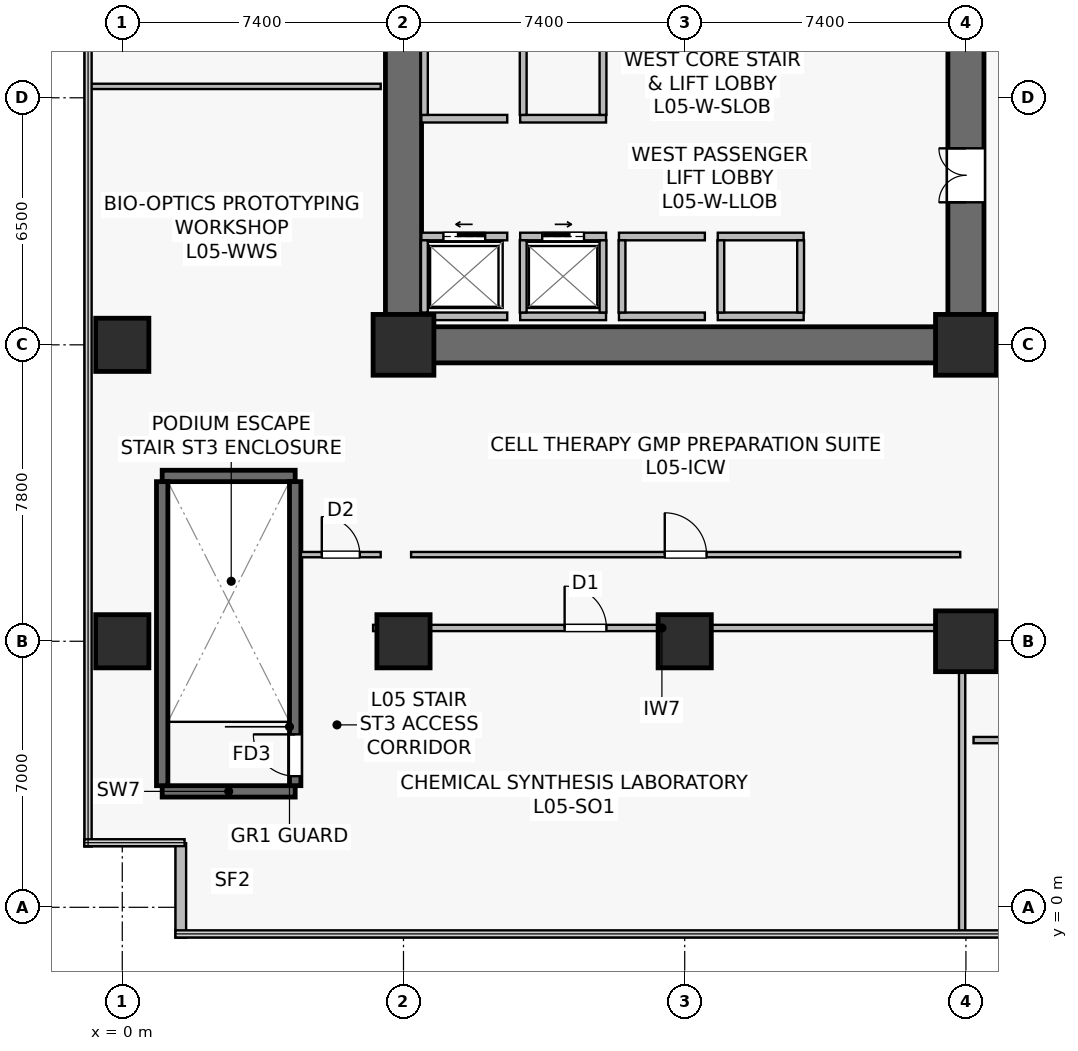
"""IFC4 building model, lengths in metres.
Left out: names, types, materials, properties, quantities, classifications, styles, units other than length and angle.
Written with IfcOpenShell. Run it as: python <this file> out.ifc"""

import sys

from ifc_helpers import new_model, si_unit, direction, frame, frame_2d, origin, origin_2d, place, context, subcontext, project, spatial, rectangle, extrude, source, transform, mapped, element, fill, save


model = new_model("IFC4")
c1 = context("Model", 3, precision=1e-05, world=origin(), true_north=direction((0.0, 1.0)))
c2 = subcontext(c1, "Body", "Model", "MODEL_VIEW")
j1 = project(units=[si_unit("LENGTHUNIT", "METRE"), si_unit("PLANEANGLEUNIT", "RADIAN")], contexts=[c1])
p1 = place(None, origin())
s1 = spatial("IfcSite", under=j1, at=p1, CompositionType="ELEMENT")
p2 = place(p1, origin())
s2 = spatial("IfcBuilding", under=s1, at=p2, CompositionType="ELEMENT")
p3 = place(p2, frame((0.0, 0.0, 19.8)))
s3 = spatial("IfcBuildingStorey", under=s2, at=p3, CompositionType="ELEMENT", Elevation=19.8)
p4 = place(p3, frame((6.925, 14.8, 0.0), z_axis=(0.0, 0.0, 1.0), x_axis=(1.0, 0.0, 0.0)))
e1 = element("IfcWall", 1, at=p4, inside=s3, PredefinedType="SHEAR", context=c2, shape_type="SweptSolid", body=[
    extrude(rectangle(XDim=15.75, YDim=0.95, at=frame_2d((7.875, 0.0))), origin(), (0.0, 0.0, 1.0), 5.08),
])
p5 = place(p3, frame((7.4, 15.275, 0.0), z_axis=(0.0, 0.0, 1.0), x_axis=(0.0, 1.0, 0.0)))
e2 = element("IfcWall", 2, at=p5, inside=s3, PredefinedType="SHEAR", context=c2, shape_type="SweptSolid", body=[
    extrude(rectangle(XDim=18.05, YDim=0.95, at=frame_2d((9.025, 0.0))), origin(), (0.0, 0.0, 1.0), 5.08),
])
p6 = place(p3, frame((22.2, 15.275, 0.0), z_axis=(0.0, 0.0, 1.0), x_axis=(0.0, 1.0, 0.0)))
e3 = element("IfcWall", 3, at=p6, inside=s3, PredefinedType="SHEAR", context=c2, shape_type="SweptSolid", body=[
    extrude(rectangle(XDim=18.05, YDim=0.95, at=frame_2d((9.025, 0.0))), origin(), (0.0, 0.0, 1.0), 5.08),
])
p7 = place(p6, frame((3.275, 0.0, 0.0)))
e4 = element("IfcOpeningElement", 4, at=p7, cuts=e3, PredefinedType="OPENING", context=c2, shape_type="SweptSolid", body=[
    extrude(rectangle(XDim=1.42, YDim=2.2, at=frame_2d((0.71, 1.1))), frame((0.0, 0.485, 0.0), z_axis=(0.0, -1.0, 0.0), x_axis=(1.0, 0.0, 0.0)), (0.0, 0.0, 1.0), 0.97),
])
for number, where, z_axis, x_axis in (
    (5, (1.05, 3.05, 0.0), (0.0, 0.0, 1.0), (1.0, 0.0, 0.0)),
    (6, (1.05, 11.35, 0.0), (0.0, 0.0, 1.0), (1.0, 0.0, 0.0)),
):
    element("IfcWall", number, at=place(p3, frame(where, z_axis=z_axis, x_axis=x_axis)), inside=s3, PredefinedType="SHEAR", context=c2, shape_type="SweptSolid", body=[
        extrude(rectangle(XDim=3.5, YDim=0.3, at=frame_2d((1.75, 0.0))), origin(), (0.0, 0.0, 1.0), 5.08),
    ])
p8 = place(p3, frame((1.05, 3.2, 0.0), z_axis=(0.0, 0.0, 1.0), x_axis=(0.0, 1.0, 0.0)))
e7 = element("IfcWall", 7, at=p8, inside=s3, PredefinedType="SHEAR", context=c2, shape_type="SweptSolid", body=[
    extrude(rectangle(XDim=8.0, YDim=0.3, at=frame_2d((4.0, 0.0))), origin(), (0.0, 0.0, 1.0), 5.08),
])
p9 = place(p3, frame((4.55, 3.2, 0.0), z_axis=(0.0, 0.0, 1.0), x_axis=(0.0, 1.0, 0.0)))
e8 = element("IfcWall", 8, at=p9, inside=s3, PredefinedType="SHEAR", context=c2, shape_type="SweptSolid", body=[
    extrude(rectangle(XDim=8.0, YDim=0.3, at=frame_2d((4.0, 0.0))), origin(), (0.0, 0.0, 1.0), 5.08),
])
p10 = place(p9, frame((0.25, 0.0, 0.0)))
e9 = element("IfcOpeningElement", 9, at=p10, cuts=e8, PredefinedType="OPENING", context=c2, shape_type="SweptSolid", body=[
    extrude(rectangle(XDim=1.1, YDim=2.15, at=frame_2d((0.55, 1.075))), frame((0.0, 0.16, 0.0), z_axis=(0.0, -1.0, 0.0), x_axis=(1.0, 0.0, 0.0)), (0.0, 0.0, 1.0), 0.32),
])
m1 = source(origin(), c2, "Body", "SweptSolid", [
    extrude(rectangle(XDim=1.4, YDim=1.4, at=origin_2d()), origin(), (0.0, 0.0, 1.0), 5.4),
])
p11 = place(p3, frame((14.8, 7.0, 0.0), z_axis=(0.0, 0.0, 1.0), x_axis=(1.0, 0.0, 0.0)))
e10 = element("IfcColumn", 10, at=p11, inside=s3, PredefinedType="COLUMN", context=c2, shape_type="MappedRepresentation", body=[
    mapped(m1, transform((0.0, 0.0, 0.0), scale=1.0)),
])
m2 = source(origin(), c2, "Body", "SweptSolid", [
    extrude(rectangle(XDim=1.6, YDim=1.6, at=origin_2d()), origin(), (0.0, 0.0, 1.0), 5.4),
])
for number, where, z_axis, x_axis in (
    (11, (22.2, 7.0, 0.0), (0.0, 0.0, 1.0), (1.0, 0.0, 0.0)),
    (12, (7.4, 14.8, 0.0), (0.0, 0.0, 1.0), (1.0, 0.0, 0.0)),
    (13, (22.2, 14.8, 0.0), (0.0, 0.0, 1.0), (1.0, 0.0, 0.0)),
):
    element("IfcColumn", number, at=place(p3, frame(where, z_axis=z_axis, x_axis=x_axis)), inside=s3, PredefinedType="COLUMN", context=c2, shape_type="MappedRepresentation", body=[
        mapped(m2, transform((0.0, 0.0, 0.0), scale=1.0)),
    ])
for number, where, z_axis, x_axis in (
    (14, (7.4, 7.0, 0.0), (0.0, 0.0, 1.0), (1.0, 0.0, 0.0)),
    (15, (0.0, 7.0, 0.0), (0.0, 0.0, 1.0), (1.0, 0.0, 0.0)),
    (16, (0.0, 14.8, 0.0), (0.0, 0.0, 1.0), (1.0, 0.0, 0.0)),
):
    element("IfcColumn", number, at=place(p3, frame(where, z_axis=z_axis, x_axis=x_axis)), inside=s3, PredefinedType="COLUMN", context=c2, shape_type="MappedRepresentation", body=[
        mapped(m1, transform((0.0, 0.0, 0.0), scale=1.0)),
    ])
p12 = place(p3, frame((1.54, 1.688, 0.0), z_axis=(0.0, 0.0, 1.0), x_axis=(0.0, -1.0, 0.0)))
e17 = element("IfcWall", 17, at=p12, inside=s3, PredefinedType="STANDARD", context=c2, shape_type="SweptSolid", body=[
    extrude(rectangle(XDim=2.488, YDim=0.28, at=frame_2d((1.244, 0.0))), origin(), (0.0, 0.0, 1.0), 5.08),
])
p13 = place(p3, frame((7.87, 17.65, 0.0), z_axis=(0.0, 0.0, 1.0), x_axis=(1.0, 0.0, 0.0)))
e18 = element("IfcWall", 18, at=p13, inside=s3, PredefinedType="SOLIDWALL", context=c2, shape_type="SweptSolid", body=[
    extrude(rectangle(XDim=2.26, YDim=0.2, at=frame_2d((1.13, 0.0))), origin(), (0.0, 0.0, 1.0), 5.08),
])
p14 = place(p13, frame((0.58, 0.0, 0.0)))
e19 = element("IfcOpeningElement", 19, at=p14, cuts=e18, PredefinedType="OPENING", context=c2, shape_type="SweptSolid", body=[
    extrude(rectangle(XDim=1.1, YDim=2.22, at=frame_2d((0.55, 1.11))), frame((0.0, 0.11, 0.0), z_axis=(0.0, -1.0, 0.0), x_axis=(1.0, 0.0, 0.0)), (0.0, 0.0, 1.0), 0.22),
])
p15 = place(p3, frame((7.87, 15.55, 0.0), z_axis=(0.0, 0.0, 1.0), x_axis=(1.0, 0.0, 0.0)))
e20 = element("IfcWall", 20, at=p15, inside=s3, PredefinedType="SOLIDWALL", context=c2, shape_type="SweptSolid", body=[
    extrude(rectangle(XDim=2.26, YDim=0.2, at=frame_2d((1.13, 0.0))), origin(), (0.0, 0.0, 1.0), 5.08),
])
p16 = place(p3, frame((7.95, 15.65, 0.0), z_axis=(0.0, 0.0, 1.0), x_axis=(0.0, 1.0, 0.0)))
e21 = element("IfcWall", 21, at=p16, inside=s3, PredefinedType="SOLIDWALL", context=c2, shape_type="SweptSolid", body=[
    extrude(rectangle(XDim=1.9, YDim=0.18, at=frame_2d((0.95, 0.0))), origin(), (0.0, 0.0, 1.0), 5.08),
])
p17 = place(p3, frame((10.47, 17.65, 0.0), z_axis=(0.0, 0.0, 1.0), x_axis=(1.0, 0.0, 0.0)))
e22 = element("IfcWall", 22, at=p17, inside=s3, PredefinedType="SOLIDWALL", context=c2, shape_type="SweptSolid", body=[
    extrude(rectangle(XDim=2.26, YDim=0.2, at=frame_2d((1.13, 0.0))), origin(), (0.0, 0.0, 1.0), 5.08),
])
p18 = place(p17, frame((0.58, 0.0, 0.0)))
e23 = element("IfcOpeningElement", 23, at=p18, cuts=e22, PredefinedType="OPENING", context=c2, shape_type="SweptSolid", body=[
    extrude(rectangle(XDim=1.1, YDim=2.22, at=frame_2d((0.55, 1.11))), frame((0.0, 0.11, 0.0), z_axis=(0.0, -1.0, 0.0), x_axis=(1.0, 0.0, 0.0)), (0.0, 0.0, 1.0), 0.22),
])
p19 = place(p3, frame((10.47, 15.55, 0.0), z_axis=(0.0, 0.0, 1.0), x_axis=(1.0, 0.0, 0.0)))
e24 = element("IfcWall", 24, at=p19, inside=s3, PredefinedType="SOLIDWALL", context=c2, shape_type="SweptSolid", body=[
    extrude(rectangle(XDim=2.26, YDim=0.2, at=frame_2d((1.13, 0.0))), origin(), (0.0, 0.0, 1.0), 5.08),
])
for number, where, z_axis, x_axis in (
    (25, (10.55, 15.65, 0.0), (0.0, 0.0, 1.0), (0.0, 1.0, 0.0)),
    (26, (12.65, 15.65, 0.0), (0.0, 0.0, 1.0), (0.0, 1.0, 0.0)),
):
    element("IfcWall", number, at=place(p3, frame(where, z_axis=z_axis, x_axis=x_axis)), inside=s3, PredefinedType="SOLIDWALL", context=c2, shape_type="SweptSolid", body=[
        extrude(rectangle(XDim=1.9, YDim=0.18, at=frame_2d((0.95, 0.0))), origin(), (0.0, 0.0, 1.0), 5.08),
    ])
for number, where, z_axis, x_axis in (
    (27, (13.07, 17.65, 0.0), (0.0, 0.0, 1.0), (1.0, 0.0, 0.0)),
    (28, (13.07, 15.55, 0.0), (0.0, 0.0, 1.0), (1.0, 0.0, 0.0)),
):
    element("IfcWall", number, at=place(p3, frame(where, z_axis=z_axis, x_axis=x_axis)), inside=s3, PredefinedType="SOLIDWALL", context=c2, shape_type="SweptSolid", body=[
        extrude(rectangle(XDim=2.26, YDim=0.2, at=frame_2d((1.13, 0.0))), origin(), (0.0, 0.0, 1.0), 4.365),
    ])
p20 = place(p3, frame((13.15, 15.65, 0.0), z_axis=(0.0, 0.0, 1.0), x_axis=(0.0, 1.0, 0.0)))
e29 = element("IfcWall", 29, at=p20, inside=s3, PredefinedType="SOLIDWALL", context=c2, shape_type="SweptSolid", body=[
    extrude(rectangle(XDim=1.9, YDim=0.18, at=frame_2d((0.95, 0.0))), origin(), (0.0, 0.0, 1.0), 5.08),
])
for number, where, z_axis, x_axis in (
    (30, (15.67, 17.65, 0.0), (0.0, 0.0, 1.0), (1.0, 0.0, 0.0)),
    (31, (15.67, 15.55, 0.0), (0.0, 0.0, 1.0), (1.0, 0.0, 0.0)),
):
    element("IfcWall", number, at=place(p3, frame(where, z_axis=z_axis, x_axis=x_axis)), inside=s3, PredefinedType="SOLIDWALL", context=c2, shape_type="SweptSolid", body=[
        extrude(rectangle(XDim=2.26, YDim=0.2, at=frame_2d((1.13, 0.0))), origin(), (0.0, 0.0, 1.0), 5.08),
    ])
for number, where, z_axis, x_axis in (
    (32, (15.75, 15.65, 0.0), (0.0, 0.0, 1.0), (0.0, 1.0, 0.0)),
    (33, (17.85, 15.65, 0.0), (0.0, 0.0, 1.0), (0.0, 1.0, 0.0)),
):
    element("IfcWall", number, at=place(p3, frame(where, z_axis=z_axis, x_axis=x_axis)), inside=s3, PredefinedType="SOLIDWALL", context=c2, shape_type="SweptSolid", body=[
        extrude(rectangle(XDim=1.9, YDim=0.18, at=frame_2d((0.95, 0.0))), origin(), (0.0, 0.0, 1.0), 5.08),
    ])
p21 = place(p3, frame((7.87, 20.75, 0.0), z_axis=(0.0, 0.0, 1.0), x_axis=(1.0, 0.0, 0.0)))
e34 = element("IfcWall", 34, at=p21, inside=s3, PredefinedType="SOLIDWALL", context=c2, shape_type="SweptSolid", body=[
    extrude(rectangle(XDim=2.26, YDim=0.2, at=frame_2d((1.13, 0.0))), origin(), (0.0, 0.0, 1.0), 5.08),
])
p22 = place(p3, frame((7.95, 20.85, 0.0), z_axis=(0.0, 0.0, 1.0), x_axis=(0.0, 1.0, 0.0)))
e35 = element("IfcWall", 35, at=p22, inside=s3, PredefinedType="SOLIDWALL", context=c2, shape_type="SweptSolid", body=[
    extrude(rectangle(XDim=1.9, YDim=0.18, at=frame_2d((0.95, 0.0))), origin(), (0.0, 0.0, 1.0), 5.08),
])
p23 = place(p3, frame((10.47, 20.75, 0.0), z_axis=(0.0, 0.0, 1.0), x_axis=(1.0, 0.0, 0.0)))
e36 = element("IfcWall", 36, at=p23, inside=s3, PredefinedType="SOLIDWALL", context=c2, shape_type="SweptSolid", body=[
    extrude(rectangle(XDim=2.26, YDim=0.2, at=frame_2d((1.13, 0.0))), origin(), (0.0, 0.0, 1.0), 5.08),
])
for number, where, z_axis, x_axis in (
    (37, (10.55, 20.85, 0.0), (0.0, 0.0, 1.0), (0.0, 1.0, 0.0)),
    (38, (12.65, 20.85, 0.0), (0.0, 0.0, 1.0), (0.0, 1.0, 0.0)),
):
    element("IfcWall", number, at=place(p3, frame(where, z_axis=z_axis, x_axis=x_axis)), inside=s3, PredefinedType="SOLIDWALL", context=c2, shape_type="SweptSolid", body=[
        extrude(rectangle(XDim=1.9, YDim=0.18, at=frame_2d((0.95, 0.0))), origin(), (0.0, 0.0, 1.0), 5.08),
    ])
p24 = place(p3, frame((6.6, 7.35, 0.0), z_axis=(0.0, 0.0, 1.0), x_axis=(1.0, 0.0, 0.0)))
e39 = element("IfcWall", 39, at=p24, inside=s3, PredefinedType="PARTITIONING", context=c2, shape_type="SweptSolid", body=[
    extrude(rectangle(XDim=15.2, YDim=0.165, at=frame_2d((7.6, 0.0))), origin(), (0.0, 0.0, 1.0), 4.365),
])
p25 = place(p24, frame((5.04, 0.0, 0.0)))
e40 = element("IfcOpeningElement", 40, at=p25, cuts=e39, PredefinedType="OPENING", context=c2, shape_type="SweptSolid", body=[
    extrude(rectangle(XDim=1.1, YDim=2.18, at=frame_2d((0.55, 1.09))), frame((0.0, 0.093, 0.0), z_axis=(0.0, -1.0, 0.0), x_axis=(1.0, 0.0, 0.0)), (0.0, 0.0, 1.0), 0.185),
])
p26 = place(p3, frame((22.4, 4.4, 0.0), z_axis=(0.0, 0.0, 1.0), x_axis=(1.0, 0.0, 0.0)))
e41 = element("IfcWall", 41, at=p26, inside=s3, PredefinedType="PARTITIONING", context=c2, shape_type="SweptSolid", body=[
    extrude(rectangle(XDim=13.8, YDim=0.165, at=frame_2d((6.9, 0.0))), origin(), (0.0, 0.0, 1.0), 5.08),
])
p27 = place(p26, frame((6.35, 0.0, 0.0)))
e42 = element("IfcOpeningElement", 42, at=p27, cuts=e41, PredefinedType="OPENING", context=c2, shape_type="SweptSolid", body=[
    extrude(rectangle(XDim=1.1, YDim=2.18, at=frame_2d((0.55, 1.09))), frame((0.0, 0.093, 0.0), z_axis=(0.0, -1.0, 0.0), x_axis=(1.0, 0.0, 0.0)), (0.0, 0.0, 1.0), 0.185),
])
p28 = place(p3, frame((22.1, -0.68, 0.0), z_axis=(0.0, 0.0, 1.0), x_axis=(0.0, 1.0, 0.0)))
e43 = element("IfcWall", 43, at=p28, inside=s3, PredefinedType="PARTITIONING", context=c2, shape_type="SweptSolid", body=[
    extrude(rectangle(XDim=8.03, YDim=0.165, at=frame_2d((4.015, 0.0))), origin(), (0.0, 0.0, 1.0), 4.165),
])
p29 = place(p3, frame((7.6, 9.28, 0.0), z_axis=(0.0, 0.0, 1.0), x_axis=(1.0, 0.0, 0.0)))
e44 = element("IfcWall", 44, at=p29, inside=s3, PredefinedType="PARTITIONING", context=c2, shape_type="SweptSolid", body=[
    extrude(rectangle(XDim=14.45, YDim=0.14, at=frame_2d((7.225, 0.0))), origin(), (0.0, 0.0, 1.0), 4.365),
])
p30 = place(p29, frame((6.675, 0.0, 0.0)))
e45 = element("IfcOpeningElement", 45, at=p30, cuts=e44, PredefinedType="OPENING", context=c2, shape_type="SweptSolid", body=[
    extrude(rectangle(XDim=1.1, YDim=2.18, at=frame_2d((0.55, 1.09))), frame((0.0, 0.08, 0.0), z_axis=(0.0, -1.0, 0.0), x_axis=(1.0, 0.0, 0.0)), (0.0, 0.0, 1.0), 0.16),
])
p31 = place(p3, frame((-0.85, 21.6, 0.0), z_axis=(0.0, 0.0, 1.0), x_axis=(1.0, 0.0, 0.0)))
e46 = element("IfcWall", 46, at=p31, inside=s3, PredefinedType="PARTITIONING", context=c2, shape_type="SweptSolid", body=[
    extrude(rectangle(XDim=7.65, YDim=0.14, at=frame_2d((3.825, 0.0))), origin(), (0.0, 0.0, 1.0), 4.465),
])
p32 = place(p3, frame((4.7, 9.28, 0.0), z_axis=(0.0, 0.0, 1.0), x_axis=(1.0, 0.0, 0.0)))
e47 = element("IfcWall", 47, at=p32, inside=s3, PredefinedType="PARTITIONING", context=c2, shape_type="SweptSolid", body=[
    extrude(rectangle(XDim=2.1, YDim=0.14, at=frame_2d((1.05, 0.0))), origin(), (0.0, 0.0, 1.0), 5.08),
])
p33 = place(p32, frame((0.55, 0.0, 0.0)))
e48 = element("IfcOpeningElement", 48, at=p33, cuts=e47, PredefinedType="OPENING", context=c2, shape_type="SweptSolid", body=[
    extrude(rectangle(XDim=1.0, YDim=2.15, at=frame_2d((0.5, 1.075))), frame((0.0, 0.08, 0.0), z_axis=(0.0, -1.0, 0.0), x_axis=(1.0, 0.0, 0.0)), (0.0, 0.0, 1.0), 0.16),
])
m3 = source(origin(), c2, "Body", "SweptSolid", [
    extrude(rectangle(XDim=1.1, YDim=2.22, at=frame_2d((0.55, 1.11))), frame((0.0, 0.025, 0.0), z_axis=(0.0, -1.0, 0.0), x_axis=(1.0, 0.0, 0.0)), (0.0, 0.0, 1.0), 0.05),
])
p34 = place(p14, origin())
e49 = element("IfcDoor", 49, at=p34, inside=s3, OperationType="SLIDING_TO_LEFT", PredefinedType="USERDEFINED", context=c2, shape_type="MappedRepresentation", body=[
    mapped(m3, transform((0.0, 0.0, 0.0), scale=1.0)),
])
fill(e19, e49)
p35 = place(p18, origin())
e50 = element("IfcDoor", 50, at=p35, inside=s3, OperationType="SLIDING_TO_RIGHT", PredefinedType="USERDEFINED", context=c2, shape_type="MappedRepresentation", body=[
    mapped(m3, transform((0.0, 0.0, 0.0), scale=1.0)),
])
fill(e23, e50)
m4 = source(origin(), c2, "Body", "SweptSolid", [
    extrude(rectangle(XDim=1.42, YDim=2.2, at=frame_2d((0.71, 1.1))), frame((0.0, 0.025, 0.0), z_axis=(0.0, -1.0, 0.0), x_axis=(1.0, 0.0, 0.0)), (0.0, 0.0, 1.0), 0.05),
])
p36 = place(p7, origin())
e51 = element("IfcDoor", 51, at=p36, inside=s3, OperationType="DOUBLE_DOOR_SINGLE_SWING", PredefinedType="DOOR", context=c2, shape_type="MappedRepresentation", body=[
    mapped(m4, transform((0.0, 0.0, 0.0), scale=1.0)),
])
fill(e4, e51)
m5 = source(origin(), c2, "Body", "SweptSolid", [
    extrude(rectangle(XDim=1.1, YDim=2.15, at=frame_2d((0.55, 1.075))), frame((0.0, 0.025, 0.0), z_axis=(0.0, -1.0, 0.0), x_axis=(1.0, 0.0, 0.0)), (0.0, 0.0, 1.0), 0.05),
])
p37 = place(p10, origin())
e52 = element("IfcDoor", 52, at=p37, inside=s3, OperationType="SINGLE_SWING_RIGHT", PredefinedType="DOOR", context=c2, shape_type="MappedRepresentation", body=[
    mapped(m5, transform((0.0, 0.0, 0.0), scale=1.0)),
])
fill(e9, e52)
m6 = source(origin(), c2, "Body", "SweptSolid", [
    extrude(rectangle(XDim=1.1, YDim=2.18, at=frame_2d((0.55, 1.09))), frame((0.0, 0.025, 0.0), z_axis=(0.0, -1.0, 0.0), x_axis=(1.0, 0.0, 0.0)), (0.0, 0.0, 1.0), 0.05),
])
p38 = place(p25, origin())
e53 = element("IfcDoor", 53, at=p38, inside=s3, OperationType="SINGLE_SWING_LEFT", PredefinedType="DOOR", context=c2, shape_type="MappedRepresentation", body=[
    mapped(m6, transform((0.0, 0.0, 0.0), scale=1.0)),
])
fill(e40, e53)
p39 = place(p30, origin())
e54 = element("IfcDoor", 54, at=p39, inside=s3, OperationType="SINGLE_SWING_LEFT", PredefinedType="DOOR", context=c2, shape_type="MappedRepresentation", body=[
    mapped(m6, transform((0.0, 0.0, 0.0), scale=1.0)),
])
fill(e45, e54)
m7 = source(origin(), c2, "Body", "SweptSolid", [
    extrude(rectangle(XDim=1.0, YDim=2.15, at=frame_2d((0.5, 1.075))), frame((0.0, 0.025, 0.0), z_axis=(0.0, -1.0, 0.0), x_axis=(1.0, 0.0, 0.0)), (0.0, 0.0, 1.0), 0.05),
])
p40 = place(p33, origin())
e55 = element("IfcDoor", 55, at=p40, inside=s3, OperationType="SINGLE_SWING_LEFT", PredefinedType="DOOR", context=c2, shape_type="MappedRepresentation", body=[
    mapped(m7, transform((0.0, 0.0, 0.0), scale=1.0)),
])
fill(e48, e55)
save(model, sys.argv[1])
